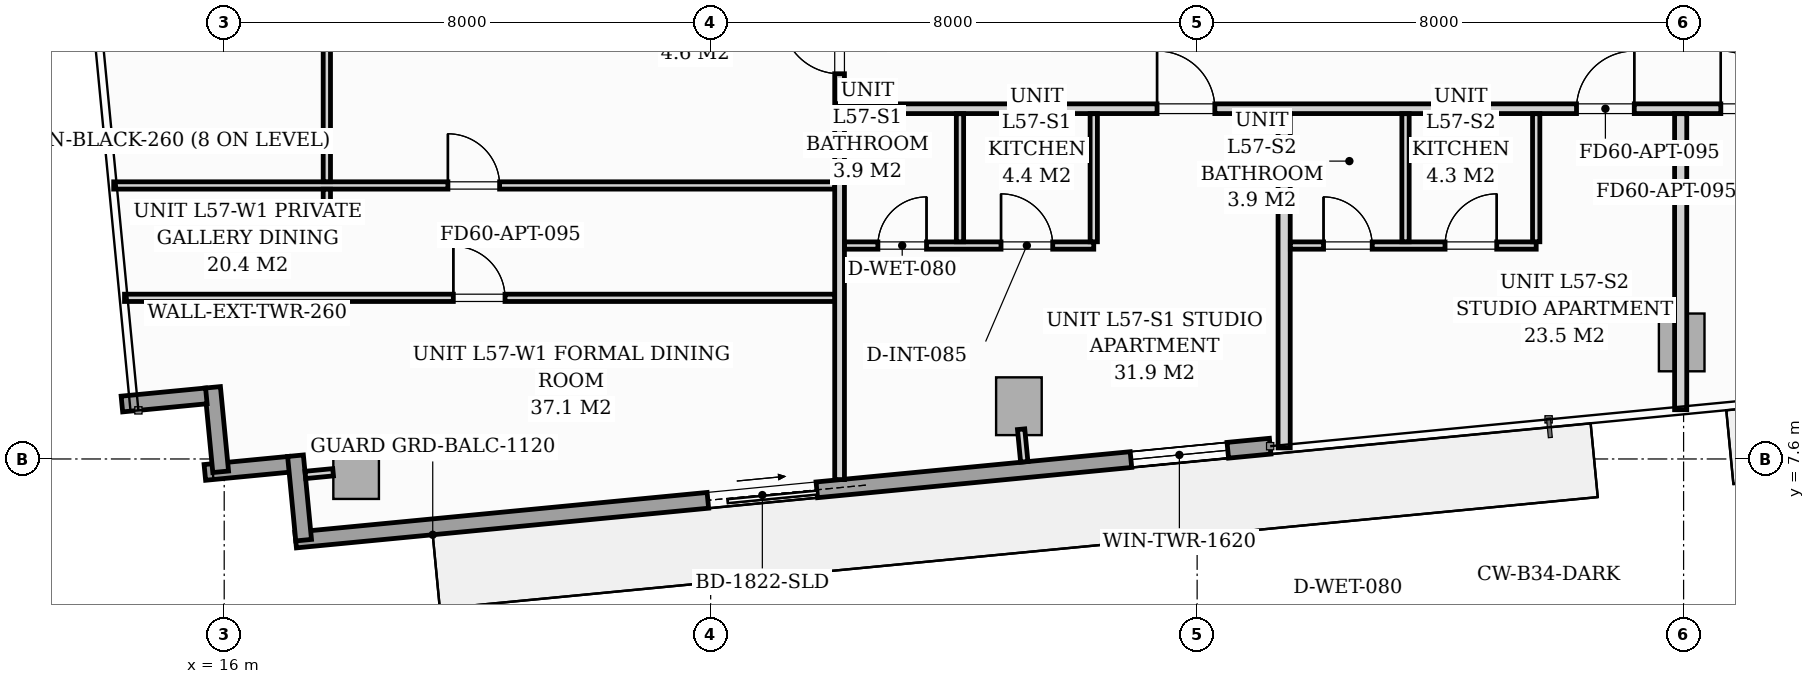
"""IFC4 building model, lengths in metres.
Left out: names, types, materials, properties, quantities, classifications, styles, units other than length and angle.
Written with IfcOpenShell. Run it as: python <this file> out.ifc"""

import sys

from ifc_helpers import new_model, si_unit, direction, frame, frame_2d, origin, origin_2d, place, context, subcontext, project, spatial, rectangle, extrude, source, transform, mapped, element, fill, save


model = new_model("IFC4")
c1 = context("Model", 3, precision=1e-05, world=origin(), true_north=direction((0.0, 1.0)))
c2 = subcontext(c1, "Body", "Model", "MODEL_VIEW")
j1 = project(units=[si_unit("LENGTHUNIT", "METRE"), si_unit("PLANEANGLEUNIT", "RADIAN")], contexts=[c1])
p1 = place(None, origin())
s1 = spatial("IfcSite", under=j1, at=p1, CompositionType="ELEMENT")
p2 = place(p1, origin())
s2 = spatial("IfcBuilding", under=s1, at=p2, CompositionType="ELEMENT")
p3 = place(p2, frame((0.0, 0.0, 198.6)))
s3 = spatial("IfcBuildingStorey", under=s2, at=p3, CompositionType="ELEMENT", Elevation=198.6)
m1 = source(origin(), c2, "Body", "SweptSolid", [
    extrude(rectangle(XDim=0.75, YDim=0.95, at=origin_2d()), origin(), (0.0, 0.0, 1.0), 3.196),
])
for number, where, z_axis, x_axis in (
    (1, (18.169, 7.418, 0.002), (0.0, 0.0, 1.0), (0.995, 0.096, 0.0)),
    (2, (29.069, 8.467, 0.002), (0.0, 0.0, 1.0), (0.995, 0.096, 0.0)),
    (3, (39.969, 9.517, 0.002), (0.0, 0.0, 1.0), (0.995, 0.096, 0.0)),
):
    element("IfcColumn", number, at=place(p3, frame(where, z_axis=z_axis, x_axis=x_axis)), inside=s3, PredefinedType="COLUMN", context=c2, shape_type="MappedRepresentation", body=[
        mapped(m1, transform((0.0, 0.0, 0.0), scale=1.0)),
    ])
p4 = place(p3, frame((17.07, 7.513, 0.0), z_axis=(0.0, 0.0, 1.0), x_axis=(-0.995391056452, -0.09589913835, 0.0)))
e4 = element("IfcWall", 4, at=p4, inside=s3, PredefinedType="STANDARD", context=c2, shape_type="SweptSolid", body=[
    extrude(rectangle(XDim=1.395, YDim=0.26, at=frame_2d((0.698, 0.0))), origin(), (0.0, 0.0, 1.0), 2.94),
])
p5 = place(p3, frame((15.942, 7.389, 0.0), z_axis=(0.0, 0.0, 1.0), x_axis=(-0.095742423056, 0.99540614245, 0.0)))
e5 = element("IfcWall", 5, at=p5, inside=s3, PredefinedType="STANDARD", context=c2, shape_type="SweptSolid", body=[
    extrude(rectangle(XDim=1.395, YDim=0.26, at=frame_2d((0.697, 0.0))), origin(), (0.0, 0.0, 1.0), 2.94),
])
p6 = place(p3, frame((15.706, 8.637, 0.0), z_axis=(0.0, 0.0, 1.0), x_axis=(-0.995391056452, -0.09589913835, 0.0)))
e6 = element("IfcWall", 6, at=p6, inside=s3, PredefinedType="STANDARD", context=c2, shape_type="SweptSolid", body=[
    extrude(rectangle(XDim=1.395, YDim=0.26, at=frame_2d((0.698, 0.0))), origin(), (0.0, 0.0, 1.0), 2.94),
])
p7 = place(p3, frame((33.201, 7.81, 0.0), z_axis=(0.0, 0.0, 1.0), x_axis=(-0.995397074604, -0.095836652014, 0.0)))
e7 = element("IfcWall", 7, at=p7, inside=s3, PredefinedType="STANDARD", context=c2, shape_type="SweptSolid", body=[
    extrude(rectangle(XDim=16.1, YDim=0.26, at=frame_2d((8.05, 0.0))), origin(), (0.0, 0.0, 1.0), 2.94),
])
p8 = place(p7, frame((7.49, 0.0, 0.0)))
e8 = element("IfcOpeningElement", 8, at=p8, cuts=e7, PredefinedType="OPENING", context=c2, shape_type="SweptSolid", body=[
    extrude(rectangle(XDim=1.8, YDim=2.06, at=frame_2d((0.9, 1.03))), frame((0.0, 0.14, 0.0), z_axis=(0.0, -1.0, 0.0), x_axis=(1.0, 0.0, 0.0)), (0.0, 0.0, 1.0), 0.28),
])
p9 = place(p7, frame((0.7, 0.0, 0.65)))
e9 = element("IfcOpeningElement", 9, at=p9, cuts=e7, PredefinedType="OPENING", context=c2, shape_type="SweptSolid", body=[
    extrude(rectangle(XDim=1.6, YDim=1.5, at=frame_2d((0.8, 0.75))), frame((0.0, 0.14, 0.0), z_axis=(0.0, -1.0, 0.0), x_axis=(1.0, 0.0, 0.0)), (0.0, 0.0, 1.0), 0.28),
])
p10 = place(p3, frame((17.306, 6.265, 0.0), z_axis=(0.0, 0.0, 1.0), x_axis=(-0.095915846097, 0.995389446633, 0.0)))
e10 = element("IfcWall", 10, at=p10, inside=s3, PredefinedType="STANDARD", context=c2, shape_type="SweptSolid", body=[
    extrude(rectangle(XDim=1.395, YDim=0.26, at=frame_2d((0.697, 0.0))), origin(), (0.0, 0.0, 1.0), 2.94),
])
p11 = place(p3, frame((26.12, 13.36, 0.0), z_axis=(0.0, 0.0, 1.0), x_axis=(1.0, 0.0, 0.0)))
e11 = element("IfcWall", 11, at=p11, inside=s3, PredefinedType="PARTITIONING", context=c2, shape_type="SweptSolid", body=[
    extrude(rectangle(XDim=19.76, YDim=0.16, at=frame_2d((9.88, 0.0))), origin(), (0.0, 0.0, 1.0), 2.94),
])
p12 = place(p11, frame((5.221, 0.0, 0.0)))
e12 = element("IfcOpeningElement", 12, at=p12, cuts=e11, PredefinedType="OPENING", context=c2, shape_type="SweptSolid", body=[
    extrude(rectangle(XDim=0.95, YDim=2.06, at=frame_2d((0.475, 1.03))), frame((0.0, 0.09, 0.0), z_axis=(0.0, -1.0, 0.0), x_axis=(1.0, 0.0, 0.0)), (0.0, 0.0, 1.0), 0.18),
])
p13 = place(p11, frame((12.119, 0.0, 0.0)))
e13 = element("IfcOpeningElement", 13, at=p13, cuts=e11, PredefinedType="OPENING", context=c2, shape_type="SweptSolid", body=[
    extrude(rectangle(XDim=0.95, YDim=2.06, at=frame_2d((0.475, 1.03))), frame((0.0, 0.09, 0.0), z_axis=(0.0, -1.0, 0.0), x_axis=(1.0, 0.0, 0.0)), (0.0, 0.0, 1.0), 0.18),
])
p14 = place(p11, frame((14.492, 0.0, 0.0)))
e14 = element("IfcOpeningElement", 14, at=p14, cuts=e11, PredefinedType="OPENING", context=c2, shape_type="SweptSolid", body=[
    extrude(rectangle(XDim=0.95, YDim=2.06, at=frame_2d((0.475, 1.03))), frame((0.0, 0.09, 0.0), z_axis=(0.0, -1.0, 0.0), x_axis=(1.0, 0.0, 0.0)), (0.0, 0.0, 1.0), 0.18),
])
p15 = place(p3, frame((26.12, 7.261, 0.0), z_axis=(0.0, 0.0, 1.0), x_axis=(0.0, 1.0, 0.0)))
e15 = element("IfcWall", 15, at=p15, inside=s3, PredefinedType="PARTITIONING", context=c2, shape_type="SweptSolid", body=[
    extrude(rectangle(XDim=6.017, YDim=0.16, at=frame_2d((3.008, 0.0))), origin(), (0.0, 0.0, 1.0), 2.94),
])
p16 = place(p3, frame((26.12, 13.442, 0.0), z_axis=(0.0, 0.0, 1.0), x_axis=(0.0, 1.0, 0.0)))
e16 = element("IfcWall", 16, at=p16, inside=s3, PredefinedType="PARTITIONING", context=c2, shape_type="SweptSolid", body=[
    extrude(rectangle(XDim=4.36, YDim=0.16, at=frame_2d((2.18, 0.0))), origin(), (0.0, 0.0, 1.0), 2.94),
])
p17 = place(p16, frame((0.493, 0.0, 0.0)))
e17 = element("IfcOpeningElement", 17, at=p17, cuts=e16, PredefinedType="OPENING", context=c2, shape_type="SweptSolid", body=[
    extrude(rectangle(XDim=0.95, YDim=2.06, at=frame_2d((0.475, 1.03))), frame((0.0, 0.09, 0.0), z_axis=(0.0, -1.0, 0.0), x_axis=(1.0, 0.0, 0.0)), (0.0, 0.0, 1.0), 0.18),
])
p18 = place(p3, frame((26.202, 11.11, 0.0), z_axis=(0.0, 0.0, 1.0), x_axis=(1.0, 0.0, 0.0)))
e18 = element("IfcWall", 18, at=p18, inside=s3, PredefinedType="PARTITIONING", context=c2, shape_type="SweptSolid", body=[
    extrude(rectangle(XDim=4.098, YDim=0.12, at=frame_2d((2.049, 0.0))), origin(), (0.0, 0.0, 1.0), 2.94),
])
p19 = place(p18, frame((0.548, 0.0, 0.0)))
e19 = element("IfcOpeningElement", 19, at=p19, cuts=e18, PredefinedType="OPENING", context=c2, shape_type="SweptSolid", body=[
    extrude(rectangle(XDim=0.8, YDim=2.02, at=frame_2d((0.4, 1.01))), frame((0.0, 0.07, 0.0), z_axis=(0.0, -1.0, 0.0), x_axis=(1.0, 0.0, 0.0)), (0.0, 0.0, 1.0), 0.14),
])
p20 = place(p18, frame((2.573, 0.0, 0.0)))
e20 = element("IfcOpeningElement", 20, at=p20, cuts=e18, PredefinedType="OPENING", context=c2, shape_type="SweptSolid", body=[
    extrude(rectangle(XDim=0.85, YDim=2.05, at=frame_2d((0.425, 1.025))), frame((0.0, 0.07, 0.0), z_axis=(0.0, -1.0, 0.0), x_axis=(1.0, 0.0, 0.0)), (0.0, 0.0, 1.0), 0.14),
])
for number, where, z_axis, x_axis in (
    (21, (30.3, 11.172, 0.0), (0.0, 0.0, 1.0), (0.0, 1.0, 0.0)),
    (22, (28.1, 11.172, 0.0), (0.0, 0.0, 1.0), (0.0, 1.0, 0.0)),
):
    element("IfcWall", number, at=place(p3, frame(where, z_axis=z_axis, x_axis=x_axis)), inside=s3, PredefinedType="PARTITIONING", context=c2, shape_type="SweptSolid", body=[
        extrude(rectangle(XDim=2.106, YDim=0.12, at=frame_2d((1.053, 0.0))), origin(), (0.0, 0.0, 1.0), 2.94),
    ])
p21 = place(p3, frame((33.431, 7.782, 0.0), z_axis=(0.0, 0.0, 1.0), x_axis=(0.0, 1.0, 0.0)))
e23 = element("IfcWall", 23, at=p21, inside=s3, PredefinedType="PARTITIONING", context=c2, shape_type="SweptSolid", body=[
    extrude(rectangle(XDim=5.496, YDim=0.2, at=frame_2d((2.748, 0.0))), origin(), (0.0, 0.0, 1.0), 2.94),
])
p22 = place(p3, frame((33.533, 11.11, 0.0), z_axis=(0.0, 0.0, 1.0), x_axis=(1.0, 0.0, 0.0)))
e24 = element("IfcWall", 24, at=p22, inside=s3, PredefinedType="PARTITIONING", context=c2, shape_type="SweptSolid", body=[
    extrude(rectangle(XDim=4.043, YDim=0.12, at=frame_2d((2.021, 0.0))), origin(), (0.0, 0.0, 1.0), 2.94),
])
p23 = place(p22, frame((0.546, 0.0, 0.0)))
e25 = element("IfcOpeningElement", 25, at=p23, cuts=e24, PredefinedType="OPENING", context=c2, shape_type="SweptSolid", body=[
    extrude(rectangle(XDim=0.8, YDim=2.02, at=frame_2d((0.4, 1.01))), frame((0.0, 0.07, 0.0), z_axis=(0.0, -1.0, 0.0), x_axis=(1.0, 0.0, 0.0)), (0.0, 0.0, 1.0), 0.14),
])
p24 = place(p22, frame((2.544, 0.0, 0.0)))
e26 = element("IfcOpeningElement", 26, at=p24, cuts=e24, PredefinedType="OPENING", context=c2, shape_type="SweptSolid", body=[
    extrude(rectangle(XDim=0.85, YDim=2.05, at=frame_2d((0.425, 1.025))), frame((0.0, 0.07, 0.0), z_axis=(0.0, -1.0, 0.0), x_axis=(1.0, 0.0, 0.0)), (0.0, 0.0, 1.0), 0.14),
])
for number, where, z_axis, x_axis in (
    (27, (37.576, 11.172, 0.0), (0.0, 0.0, 1.0), (0.0, 1.0, 0.0)),
    (28, (35.427, 11.172, 0.0), (0.0, 0.0, 1.0), (0.0, 1.0, 0.0)),
):
    element("IfcWall", number, at=place(p3, frame(where, z_axis=z_axis, x_axis=x_axis)), inside=s3, PredefinedType="PARTITIONING", context=c2, shape_type="SweptSolid", body=[
        extrude(rectangle(XDim=2.106, YDim=0.12, at=frame_2d((1.053, 0.0))), origin(), (0.0, 0.0, 1.0), 2.94),
    ])
p25 = place(p3, frame((39.952, 8.41, 0.0), z_axis=(0.0, 0.0, 1.0), x_axis=(0.0, 1.0, 0.0)))
e29 = element("IfcWall", 29, at=p25, inside=s3, PredefinedType="PARTITIONING", context=c2, shape_type="SweptSolid", body=[
    extrude(rectangle(XDim=4.868, YDim=0.2, at=frame_2d((2.434, 0.0))), origin(), (0.0, 0.0, 1.0), 2.94),
])
p26 = place(p3, frame((14.361, 10.25, 0.0), z_axis=(0.0, 0.0, 1.0), x_axis=(1.0, 0.0, 0.0)))
e30 = element("IfcWall", 30, at=p26, inside=s3, PredefinedType="PARTITIONING", context=c2, shape_type="SweptSolid", body=[
    extrude(rectangle(XDim=11.677, YDim=0.12, at=frame_2d((5.839, 0.0))), origin(), (0.0, 0.0, 1.0), 2.94),
])
p27 = place(p26, frame((5.407, 0.0, 0.0)))
e31 = element("IfcOpeningElement", 31, at=p27, cuts=e30, PredefinedType="OPENING", context=c2, shape_type="SweptSolid", body=[
    extrude(rectangle(XDim=0.85, YDim=2.05, at=frame_2d((0.425, 1.025))), frame((0.0, 0.07, 0.0), z_axis=(0.0, -1.0, 0.0), x_axis=(1.0, 0.0, 0.0)), (0.0, 0.0, 1.0), 0.14),
])
p28 = place(p3, frame((14.183, 12.098, 0.0), z_axis=(0.0, 0.0, 1.0), x_axis=(1.0, 0.0, 0.0)))
e32 = element("IfcWall", 32, at=p28, inside=s3, PredefinedType="PARTITIONING", context=c2, shape_type="SweptSolid", body=[
    extrude(rectangle(XDim=11.855, YDim=0.12, at=frame_2d((5.928, 0.0))), origin(), (0.0, 0.0, 1.0), 2.94),
])
p29 = place(p28, frame((5.496, 0.0, 0.0)))
e33 = element("IfcOpeningElement", 33, at=p29, cuts=e32, PredefinedType="OPENING", context=c2, shape_type="SweptSolid", body=[
    extrude(rectangle(XDim=0.85, YDim=2.05, at=frame_2d((0.425, 1.025))), frame((0.0, 0.07, 0.0), z_axis=(0.0, -1.0, 0.0), x_axis=(1.0, 0.0, 0.0)), (0.0, 0.0, 1.0), 0.14),
])
p30 = place(p3, frame((17.688, 11.658, 0.0), z_axis=(0.0, 0.0, 1.0), x_axis=(0.0, 1.0, 0.0)))
e34 = element("IfcWall", 34, at=p30, inside=s3, PredefinedType="PARTITIONING", context=c2, shape_type="SweptSolid", body=[
    extrude(rectangle(XDim=0.378, YDim=0.12, at=frame_2d((0.189, 0.0))), origin(), (0.0, 0.0, 1.0), 2.94),
])
p31 = place(p3, frame((17.688, 12.16, 0.0), z_axis=(0.0, 0.0, 1.0), x_axis=(0.0, 1.0, 0.0)))
e35 = element("IfcWall", 35, at=p31, inside=s3, PredefinedType="PARTITIONING", context=c2, shape_type="SweptSolid", body=[
    extrude(rectangle(XDim=8.689, YDim=0.12, at=frame_2d((4.345, 0.0))), origin(), (0.0, 0.0, 1.0), 2.94),
])
p32 = place(p31, frame((3.92, 0.0, 0.0)))
e36 = element("IfcOpeningElement", 36, at=p32, cuts=e35, PredefinedType="OPENING", context=c2, shape_type="SweptSolid", body=[
    extrude(rectangle(XDim=0.85, YDim=2.05, at=frame_2d((0.425, 1.025))), frame((0.0, 0.07, 0.0), z_axis=(0.0, -1.0, 0.0), x_axis=(1.0, 0.0, 0.0)), (0.0, 0.0, 1.0), 0.14),
])
p33 = place(p3, frame((17.791, 7.382, 0.0), z_axis=(0.0, 0.0, 1.0), x_axis=(-0.995384576284, -0.09596637586, 0.0)))
e37 = element("IfcWall", 37, at=p33, inside=s3, PredefinedType="PARTITIONING", context=c2, shape_type="SweptSolid", body=[
    extrude(rectangle(XDim=0.458, YDim=0.12, at=frame_2d((0.229, 0.0))), origin(), (0.0, 0.0, 1.0), 2.94),
])
p34 = place(p3, frame((29.105, 8.089, 0.0), z_axis=(0.0, 0.0, 1.0), x_axis=(0.095772948675, -0.995403205893, 0.0)))
e38 = element("IfcWall", 38, at=p34, inside=s3, PredefinedType="PARTITIONING", context=c2, shape_type="SweptSolid", body=[
    extrude(rectangle(XDim=0.538, YDim=0.12, at=frame_2d((0.269, 0.0))), origin(), (0.0, 0.0, 1.0), 2.94),
])
m2 = source(origin(), c2, "Body", "SweptSolid", [
    extrude(rectangle(XDim=1.8, YDim=2.06, at=frame_2d((0.9, 1.03))), frame((0.0, 0.025, 0.0), z_axis=(0.0, -1.0, 0.0), x_axis=(1.0, 0.0, 0.0)), (0.0, 0.0, 1.0), 0.05),
])
p35 = place(p8, origin())
e39 = element("IfcDoor", 39, at=p35, inside=s3, OperationType="SLIDING_TO_LEFT", PredefinedType="DOOR", context=c2, shape_type="MappedRepresentation", body=[
    mapped(m2, transform((0.0, 0.0, 0.0), scale=1.0)),
])
fill(e8, e39)
m3 = source(origin(), c2, "Body", "SweptSolid", [
    extrude(rectangle(XDim=1.6, YDim=1.5, at=frame_2d((0.8, 0.75))), frame((0.0, 0.03, 0.0), z_axis=(0.0, -1.0, 0.0), x_axis=(1.0, 0.0, 0.0)), (0.0, 0.0, 1.0), 0.06),
])
p36 = place(p9, origin())
e40 = element("IfcWindow", 40, at=p36, inside=s3, PartitioningType="SINGLE_PANEL", PredefinedType="WINDOW", context=c2, shape_type="MappedRepresentation", body=[
    mapped(m3, transform((0.0, 0.0, 0.0), scale=1.0)),
])
fill(e9, e40)
m4 = source(origin(), c2, "Body", "SweptSolid", [
    extrude(rectangle(XDim=0.95, YDim=2.06, at=frame_2d((0.475, 1.03))), frame((0.0, 0.025, 0.0), z_axis=(0.0, -1.0, 0.0), x_axis=(1.0, 0.0, 0.0)), (0.0, 0.0, 1.0), 0.05),
])
p37 = place(p12, origin())
e41 = element("IfcDoor", 41, at=p37, inside=s3, OperationType="SINGLE_SWING_LEFT", PredefinedType="DOOR", context=c2, shape_type="MappedRepresentation", body=[
    mapped(m4, transform((0.0, 0.0, 0.0), scale=1.0)),
])
fill(e12, e41)
m5 = source(origin(), c2, "Body", "SweptSolid", [
    extrude(rectangle(XDim=0.8, YDim=2.02, at=frame_2d((0.4, 1.01))), frame((0.0, 0.025, 0.0), z_axis=(0.0, -1.0, 0.0), x_axis=(1.0, 0.0, 0.0)), (0.0, 0.0, 1.0), 0.05),
])
p38 = place(p19, origin())
e42 = element("IfcDoor", 42, at=p38, inside=s3, OperationType="SINGLE_SWING_RIGHT", PredefinedType="DOOR", context=c2, shape_type="MappedRepresentation", body=[
    mapped(m5, transform((0.0, 0.0, 0.0), scale=1.0)),
])
fill(e19, e42)
m6 = source(origin(), c2, "Body", "SweptSolid", [
    extrude(rectangle(XDim=0.85, YDim=2.05, at=frame_2d((0.425, 1.025))), frame((0.0, 0.025, 0.0), z_axis=(0.0, -1.0, 0.0), x_axis=(1.0, 0.0, 0.0)), (0.0, 0.0, 1.0), 0.05),
])
p39 = place(p20, origin())
e43 = element("IfcDoor", 43, at=p39, inside=s3, OperationType="SINGLE_SWING_LEFT", PredefinedType="DOOR", context=c2, shape_type="MappedRepresentation", body=[
    mapped(m6, transform((0.0, 0.0, 0.0), scale=1.0)),
])
fill(e20, e43)
p40 = place(p13, origin())
e44 = element("IfcDoor", 44, at=p40, inside=s3, OperationType="SINGLE_SWING_RIGHT", PredefinedType="DOOR", context=c2, shape_type="MappedRepresentation", body=[
    mapped(m4, transform((0.0, 0.0, 0.0), scale=1.0)),
])
fill(e13, e44)
p41 = place(p23, origin())
e45 = element("IfcDoor", 45, at=p41, inside=s3, OperationType="SINGLE_SWING_LEFT", PredefinedType="DOOR", context=c2, shape_type="MappedRepresentation", body=[
    mapped(m5, transform((0.0, 0.0, 0.0), scale=1.0)),
])
fill(e25, e45)
p42 = place(p24, origin())
e46 = element("IfcDoor", 46, at=p42, inside=s3, OperationType="SINGLE_SWING_RIGHT", PredefinedType="DOOR", context=c2, shape_type="MappedRepresentation", body=[
    mapped(m6, transform((0.0, 0.0, 0.0), scale=1.0)),
])
fill(e26, e46)
p43 = place(p14, origin())
e47 = element("IfcDoor", 47, at=p43, inside=s3, OperationType="SINGLE_SWING_LEFT", PredefinedType="DOOR", context=c2, shape_type="MappedRepresentation", body=[
    mapped(m4, transform((0.0, 0.0, 0.0), scale=1.0)),
])
fill(e14, e47)
p44 = place(p17, origin())
e48 = element("IfcDoor", 48, at=p44, inside=s3, OperationType="SINGLE_SWING_RIGHT", PredefinedType="DOOR", context=c2, shape_type="MappedRepresentation", body=[
    mapped(m4, transform((0.0, 0.0, 0.0), scale=1.0)),
])
fill(e17, e48)
p45 = place(p27, origin())
e49 = element("IfcDoor", 49, at=p45, inside=s3, OperationType="SINGLE_SWING_LEFT", PredefinedType="DOOR", context=c2, shape_type="MappedRepresentation", body=[
    mapped(m6, transform((0.0, 0.0, 0.0), scale=1.0)),
])
fill(e31, e49)
p46 = place(p29, origin())
e50 = element("IfcDoor", 50, at=p46, inside=s3, OperationType="SINGLE_SWING_LEFT", PredefinedType="DOOR", context=c2, shape_type="MappedRepresentation", body=[
    mapped(m6, transform((0.0, 0.0, 0.0), scale=1.0)),
])
fill(e33, e50)
save(model, sys.argv[1])
